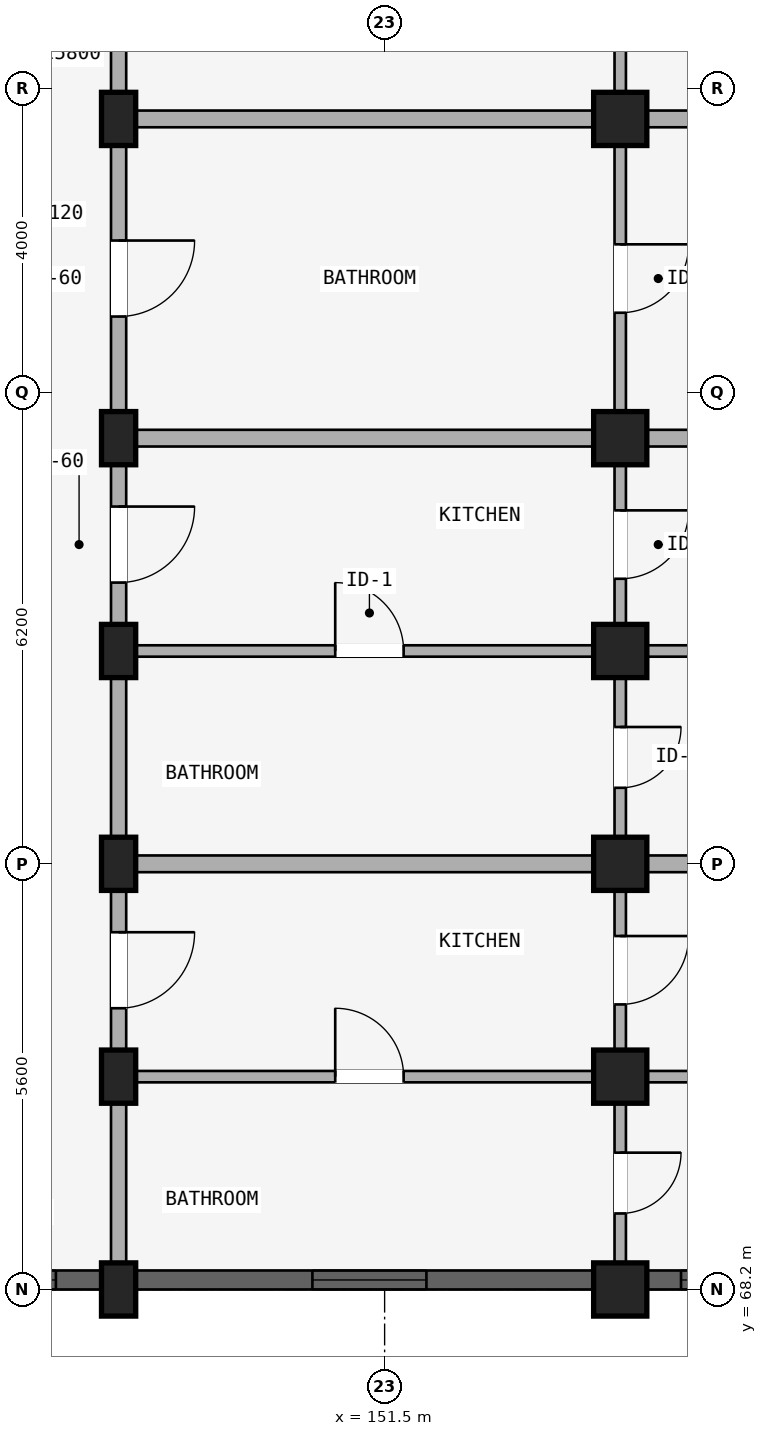
"""IFC4 building model, lengths in metres.
Left out: names, types, materials, properties, quantities, classifications, styles, units other than length and angle.
Written with IfcOpenShell. Run it as: python <this file> out.ifc"""

import sys

from ifc_helpers import new_model, si_unit, direction, frame, frame_2d, origin, origin_2d, place, context, subcontext, project, spatial, rectangle, extrude, element, fill, save


model = new_model("IFC4")
c1 = context("Model", 3, precision=1e-05, world=origin(), true_north=direction((0.0, 1.0)))
c2 = subcontext(c1, "Body", "Model", "MODEL_VIEW")
j1 = project(units=[si_unit("LENGTHUNIT", "METRE"), si_unit("PLANEANGLEUNIT", "RADIAN")], contexts=[c1])
p1 = place(None, origin())
s1 = spatial("IfcSite", under=j1, at=p1, CompositionType="ELEMENT")
p2 = place(p1, origin())
s2 = spatial("IfcBuilding", under=s1, at=p2, CompositionType="ELEMENT")
p3 = place(p2, frame((0.0, 0.0, 24.45)))
s3 = spatial("IfcBuildingStorey", under=s2, at=p3, CompositionType="ELEMENT", Elevation=24.45)
p4 = place(p3, frame((148.0, 83.6, 0.0), z_axis=(0.0, 0.0, 1.0), x_axis=(1.0, 0.0, 0.0)))
e1 = element("IfcColumn", 1, at=p4, inside=s3, PredefinedType="COLUMN", context=c2, shape_type="SweptSolid", body=[
    extrude(rectangle(XDim=0.45, YDim=0.7, at=origin_2d()), origin(), (0.0, 0.0, 1.0), 2.93),
])
p5 = place(p3, frame((154.6, 83.6, 0.0), z_axis=(0.0, 0.0, 1.0), x_axis=(1.0, 0.0, 0.0)))
e2 = element("IfcColumn", 2, at=p5, inside=s3, PredefinedType="COLUMN", context=c2, shape_type="SweptSolid", body=[
    extrude(rectangle(XDim=0.7, YDim=0.7, at=origin_2d()), origin(), (0.0, 0.0, 1.0), 2.93),
])
p6 = place(p3, frame((148.0, 79.4, 0.0), z_axis=(0.0, 0.0, 1.0), x_axis=(1.0, 0.0, 0.0)))
e3 = element("IfcColumn", 3, at=p6, inside=s3, PredefinedType="COLUMN", context=c2, shape_type="SweptSolid", body=[
    extrude(rectangle(XDim=0.45, YDim=0.7, at=origin_2d()), origin(), (0.0, 0.0, 1.0), 2.93),
])
p7 = place(p3, frame((154.6, 79.4, 0.0), z_axis=(0.0, 0.0, 1.0), x_axis=(1.0, 0.0, 0.0)))
e4 = element("IfcColumn", 4, at=p7, inside=s3, PredefinedType="COLUMN", context=c2, shape_type="SweptSolid", body=[
    extrude(rectangle(XDim=0.7, YDim=0.7, at=origin_2d()), origin(), (0.0, 0.0, 1.0), 2.93),
])
p8 = place(p3, frame((148.0, 76.6, 0.0), z_axis=(0.0, 0.0, 1.0), x_axis=(1.0, 0.0, 0.0)))
e5 = element("IfcColumn", 5, at=p8, inside=s3, PredefinedType="COLUMN", context=c2, shape_type="SweptSolid", body=[
    extrude(rectangle(XDim=0.45, YDim=0.7, at=origin_2d()), origin(), (0.0, 0.0, 1.0), 2.93),
])
p9 = place(p3, frame((154.6, 76.6, 0.0), z_axis=(0.0, 0.0, 1.0), x_axis=(1.0, 0.0, 0.0)))
e6 = element("IfcColumn", 6, at=p9, inside=s3, PredefinedType="COLUMN", context=c2, shape_type="SweptSolid", body=[
    extrude(rectangle(XDim=0.7, YDim=0.7, at=origin_2d()), origin(), (0.0, 0.0, 1.0), 2.93),
])
p10 = place(p3, frame((148.0, 73.8, 0.0), z_axis=(0.0, 0.0, 1.0), x_axis=(1.0, 0.0, 0.0)))
e7 = element("IfcColumn", 7, at=p10, inside=s3, PredefinedType="COLUMN", context=c2, shape_type="SweptSolid", body=[
    extrude(rectangle(XDim=0.45, YDim=0.7, at=origin_2d()), origin(), (0.0, 0.0, 1.0), 2.93),
])
p11 = place(p3, frame((154.6, 73.8, 0.0), z_axis=(0.0, 0.0, 1.0), x_axis=(1.0, 0.0, 0.0)))
e8 = element("IfcColumn", 8, at=p11, inside=s3, PredefinedType="COLUMN", context=c2, shape_type="SweptSolid", body=[
    extrude(rectangle(XDim=0.7, YDim=0.7, at=origin_2d()), origin(), (0.0, 0.0, 1.0), 2.93),
])
p12 = place(p3, frame((148.0, 71.0, 0.0), z_axis=(0.0, 0.0, 1.0), x_axis=(1.0, 0.0, 0.0)))
e9 = element("IfcColumn", 9, at=p12, inside=s3, PredefinedType="COLUMN", context=c2, shape_type="SweptSolid", body=[
    extrude(rectangle(XDim=0.45, YDim=0.7, at=origin_2d()), origin(), (0.0, 0.0, 1.0), 2.93),
])
p13 = place(p3, frame((154.6, 71.0, 0.0), z_axis=(0.0, 0.0, 1.0), x_axis=(1.0, 0.0, 0.0)))
e10 = element("IfcColumn", 10, at=p13, inside=s3, PredefinedType="COLUMN", context=c2, shape_type="SweptSolid", body=[
    extrude(rectangle(XDim=0.7, YDim=0.7, at=origin_2d()), origin(), (0.0, 0.0, 1.0), 2.93),
])
p14 = place(p3, frame((148.0, 68.2, 0.0), z_axis=(0.0, 0.0, 1.0), x_axis=(1.0, 0.0, 0.0)))
e11 = element("IfcColumn", 11, at=p14, inside=s3, PredefinedType="COLUMN", context=c2, shape_type="SweptSolid", body=[
    extrude(rectangle(XDim=0.45, YDim=0.7, at=origin_2d()), origin(), (0.0, 0.0, 1.0), 2.97),
])
p15 = place(p3, frame((154.6, 68.2, 0.0), z_axis=(0.0, 0.0, 1.0), x_axis=(1.0, 0.0, 0.0)))
e12 = element("IfcColumn", 12, at=p15, inside=s3, PredefinedType="COLUMN", context=c2, shape_type="SweptSolid", body=[
    extrude(rectangle(XDim=0.7, YDim=0.7, at=origin_2d()), origin(), (0.0, 0.0, 1.0), 2.97),
])
p16 = place(p3, frame((148.0, 87.65, 0.0), z_axis=(0.0, 0.0, 1.0), x_axis=(0.0, -1.0, 0.0)))
e13 = element("IfcWall", 13, at=p16, inside=s3, PredefinedType="STANDARD", context=c2, shape_type="SweptSolid", body=[
    extrude(rectangle(XDim=4.05, YDim=0.2, at=frame_2d((2.025, 0.0))), origin(), (0.0, 0.0, 1.0), 2.372),
])
p17 = place(p16, frame((1.525, 0.0, 0.0)))
e14 = element("IfcOpeningElement", 14, at=p17, cuts=e13, PredefinedType="OPENING", context=c2, shape_type="SweptSolid", body=[
    extrude(rectangle(XDim=1.0, YDim=2.15, at=frame_2d((0.5, 1.075))), frame((0.0, 0.11, 0.0), z_axis=(0.0, -1.0, 0.0), x_axis=(1.0, 0.0, 0.0)), (0.0, 0.0, 1.0), 0.22),
])
p18 = place(p3, frame((154.6, 87.57, 0.0), z_axis=(0.0, 0.0, 1.0), x_axis=(0.0, -1.0, 0.0)))
e15 = element("IfcWall", 15, at=p18, inside=s3, PredefinedType="PARTITIONING", context=c2, shape_type="SweptSolid", body=[
    extrude(rectangle(XDim=3.89, YDim=0.15, at=frame_2d((1.945, 0.0))), origin(), (0.0, 0.0, 1.0), 2.372),
])
p19 = place(p18, frame((1.495, 0.0, 0.0)))
e16 = element("IfcOpeningElement", 16, at=p19, cuts=e15, PredefinedType="OPENING", context=c2, shape_type="SweptSolid", body=[
    extrude(rectangle(XDim=0.9, YDim=2.1, at=frame_2d((0.45, 1.05))), frame((0.0, 0.085, 0.0), z_axis=(0.0, -1.0, 0.0), x_axis=(1.0, 0.0, 0.0)), (0.0, 0.0, 1.0), 0.17),
])
p20 = place(p3, frame((148.0, 83.6, 0.0), z_axis=(0.0, 0.0, 1.0), x_axis=(0.0, -1.0, 0.0)))
e17 = element("IfcWall", 17, at=p20, inside=s3, PredefinedType="STANDARD", context=c2, shape_type="SweptSolid", body=[
    extrude(rectangle(XDim=4.2, YDim=0.2, at=frame_2d((2.1, 0.0))), origin(), (0.0, 0.0, 1.0), 2.372),
])
p21 = place(p20, frame((1.6, 0.0, 0.0)))
e18 = element("IfcOpeningElement", 18, at=p21, cuts=e17, PredefinedType="OPENING", context=c2, shape_type="SweptSolid", body=[
    extrude(rectangle(XDim=1.0, YDim=2.15, at=frame_2d((0.5, 1.075))), frame((0.0, 0.11, 0.0), z_axis=(0.0, -1.0, 0.0), x_axis=(1.0, 0.0, 0.0)), (0.0, 0.0, 1.0), 0.22),
])
p22 = place(p3, frame((154.6, 83.52, 0.0), z_axis=(0.0, 0.0, 1.0), x_axis=(0.0, -1.0, 0.0)))
e19 = element("IfcWall", 19, at=p22, inside=s3, PredefinedType="PARTITIONING", context=c2, shape_type="SweptSolid", body=[
    extrude(rectangle(XDim=4.04, YDim=0.15, at=frame_2d((2.02, 0.0))), origin(), (0.0, 0.0, 1.0), 2.372),
])
p23 = place(p22, frame((1.57, 0.0, 0.0)))
e20 = element("IfcOpeningElement", 20, at=p23, cuts=e19, PredefinedType="OPENING", context=c2, shape_type="SweptSolid", body=[
    extrude(rectangle(XDim=0.9, YDim=2.1, at=frame_2d((0.45, 1.05))), frame((0.0, 0.085, 0.0), z_axis=(0.0, -1.0, 0.0), x_axis=(1.0, 0.0, 0.0)), (0.0, 0.0, 1.0), 0.17),
])
p24 = place(p3, frame((148.05, 83.6, 0.0), z_axis=(0.0, 0.0, 1.0), x_axis=(1.0, 0.0, 0.0)))
e21 = element("IfcWall", 21, at=p24, inside=s3, PredefinedType="STANDARD", context=c2, shape_type="SweptSolid", body=[
    extrude(rectangle(XDim=17.53, YDim=0.22, at=frame_2d((8.765, 0.0))), origin(), (0.0, 0.0, 1.0), 2.372),
])
p25 = place(p3, frame((148.0, 79.4, 0.0), z_axis=(0.0, 0.0, 1.0), x_axis=(0.0, -1.0, 0.0)))
e22 = element("IfcWall", 22, at=p25, inside=s3, PredefinedType="STANDARD", context=c2, shape_type="SweptSolid", body=[
    extrude(rectangle(XDim=2.8, YDim=0.2, at=frame_2d((1.4, 0.0))), origin(), (0.0, 0.0, 1.0), 2.372),
])
p26 = place(p25, frame((0.9, 0.0, 0.0)))
e23 = element("IfcOpeningElement", 23, at=p26, cuts=e22, PredefinedType="OPENING", context=c2, shape_type="SweptSolid", body=[
    extrude(rectangle(XDim=1.0, YDim=2.15, at=frame_2d((0.5, 1.075))), frame((0.0, 0.11, 0.0), z_axis=(0.0, -1.0, 0.0), x_axis=(1.0, 0.0, 0.0)), (0.0, 0.0, 1.0), 0.22),
])
p27 = place(p3, frame((154.6, 79.32, 0.0), z_axis=(0.0, 0.0, 1.0), x_axis=(0.0, -1.0, 0.0)))
e24 = element("IfcWall", 24, at=p27, inside=s3, PredefinedType="PLUMBINGWALL", context=c2, shape_type="SweptSolid", body=[
    extrude(rectangle(XDim=2.64, YDim=0.15, at=frame_2d((1.32, 0.0))), origin(), (0.0, 0.0, 1.0), 2.372),
])
p28 = place(p27, frame((0.87, 0.0, 0.0)))
e25 = element("IfcOpeningElement", 25, at=p28, cuts=e24, PredefinedType="OPENING", context=c2, shape_type="SweptSolid", body=[
    extrude(rectangle(XDim=0.9, YDim=2.1, at=frame_2d((0.45, 1.05))), frame((0.0, 0.085, 0.0), z_axis=(0.0, -1.0, 0.0), x_axis=(1.0, 0.0, 0.0)), (0.0, 0.0, 1.0), 0.17),
])
p29 = place(p3, frame((148.1, 79.4, 0.0), z_axis=(0.0, 0.0, 1.0), x_axis=(1.0, 0.0, 0.0)))
e26 = element("IfcWall", 26, at=p29, inside=s3, PredefinedType="STANDARD", context=c2, shape_type="SweptSolid", body=[
    extrude(rectangle(XDim=17.42, YDim=0.22, at=frame_2d((8.71, 0.0))), origin(), (0.0, 0.0, 1.0), 2.372),
])
p30 = place(p3, frame((148.0, 76.6, 0.0), z_axis=(0.0, 0.0, 1.0), x_axis=(0.0, -1.0, 0.0)))
e27 = element("IfcWall", 27, at=p30, inside=s3, PredefinedType="STANDARD", context=c2, shape_type="SweptSolid", body=[
    extrude(rectangle(XDim=2.8, YDim=0.2, at=frame_2d((1.4, 0.0))), origin(), (0.0, 0.0, 1.0), 2.372),
])
p31 = place(p3, frame((154.6, 76.52, 0.0), z_axis=(0.0, 0.0, 1.0), x_axis=(0.0, -1.0, 0.0)))
e28 = element("IfcWall", 28, at=p31, inside=s3, PredefinedType="PLUMBINGWALL", context=c2, shape_type="SweptSolid", body=[
    extrude(rectangle(XDim=2.64, YDim=0.15, at=frame_2d((1.32, 0.0))), origin(), (0.0, 0.0, 1.0), 2.372),
])
p32 = place(p31, frame((0.92, 0.0, 0.0)))
e29 = element("IfcOpeningElement", 29, at=p32, cuts=e28, PredefinedType="OPENING", context=c2, shape_type="SweptSolid", body=[
    extrude(rectangle(XDim=0.8, YDim=2.1, at=frame_2d((0.4, 1.05))), frame((0.0, 0.085, 0.0), z_axis=(0.0, -1.0, 0.0), x_axis=(1.0, 0.0, 0.0)), (0.0, 0.0, 1.0), 0.17),
])
p33 = place(p3, frame((148.1, 76.6, 0.0), z_axis=(0.0, 0.0, 1.0), x_axis=(1.0, 0.0, 0.0)))
e30 = element("IfcWall", 30, at=p33, inside=s3, PredefinedType="PARTITIONING", context=c2, shape_type="SweptSolid", body=[
    extrude(rectangle(XDim=17.42, YDim=0.15, at=frame_2d((8.71, 0.0))), origin(), (0.0, 0.0, 1.0), 2.372),
])
p34 = place(p33, frame((2.75, 0.0, 0.0)))
e31 = element("IfcOpeningElement", 31, at=p34, cuts=e30, PredefinedType="OPENING", context=c2, shape_type="SweptSolid", body=[
    extrude(rectangle(XDim=0.9, YDim=2.1, at=frame_2d((0.45, 1.05))), frame((0.0, 0.085, 0.0), z_axis=(0.0, -1.0, 0.0), x_axis=(1.0, 0.0, 0.0)), (0.0, 0.0, 1.0), 0.17),
])
p35 = place(p3, frame((148.0, 73.8, 0.0), z_axis=(0.0, 0.0, 1.0), x_axis=(0.0, -1.0, 0.0)))
e32 = element("IfcWall", 32, at=p35, inside=s3, PredefinedType="STANDARD", context=c2, shape_type="SweptSolid", body=[
    extrude(rectangle(XDim=2.8, YDim=0.2, at=frame_2d((1.4, 0.0))), origin(), (0.0, 0.0, 1.0), 2.372),
])
p36 = place(p35, frame((0.9, 0.0, 0.0)))
e33 = element("IfcOpeningElement", 33, at=p36, cuts=e32, PredefinedType="OPENING", context=c2, shape_type="SweptSolid", body=[
    extrude(rectangle(XDim=1.0, YDim=2.15, at=frame_2d((0.5, 1.075))), frame((0.0, 0.11, 0.0), z_axis=(0.0, -1.0, 0.0), x_axis=(1.0, 0.0, 0.0)), (0.0, 0.0, 1.0), 0.22),
])
p37 = place(p3, frame((154.6, 73.72, 0.0), z_axis=(0.0, 0.0, 1.0), x_axis=(0.0, -1.0, 0.0)))
e34 = element("IfcWall", 34, at=p37, inside=s3, PredefinedType="PLUMBINGWALL", context=c2, shape_type="SweptSolid", body=[
    extrude(rectangle(XDim=2.64, YDim=0.15, at=frame_2d((1.32, 0.0))), origin(), (0.0, 0.0, 1.0), 2.372),
])
p38 = place(p37, frame((0.87, 0.0, 0.0)))
e35 = element("IfcOpeningElement", 35, at=p38, cuts=e34, PredefinedType="OPENING", context=c2, shape_type="SweptSolid", body=[
    extrude(rectangle(XDim=0.9, YDim=2.1, at=frame_2d((0.45, 1.05))), frame((0.0, 0.085, 0.0), z_axis=(0.0, -1.0, 0.0), x_axis=(1.0, 0.0, 0.0)), (0.0, 0.0, 1.0), 0.17),
])
p39 = place(p3, frame((148.1, 73.8, 0.0), z_axis=(0.0, 0.0, 1.0), x_axis=(1.0, 0.0, 0.0)))
e36 = element("IfcWall", 36, at=p39, inside=s3, PredefinedType="STANDARD", context=c2, shape_type="SweptSolid", body=[
    extrude(rectangle(XDim=17.42, YDim=0.22, at=frame_2d((8.71, 0.0))), origin(), (0.0, 0.0, 1.0), 2.372),
])
p40 = place(p3, frame((148.0, 71.0, 0.0), z_axis=(0.0, 0.0, 1.0), x_axis=(0.0, -1.0, 0.0)))
e37 = element("IfcWall", 37, at=p40, inside=s3, PredefinedType="STANDARD", context=c2, shape_type="SweptSolid", body=[
    extrude(rectangle(XDim=2.8, YDim=0.2, at=frame_2d((1.4, 0.0))), origin(), (0.0, 0.0, 1.0), 2.372),
])
p41 = place(p3, frame((154.6, 70.92, 0.0), z_axis=(0.0, 0.0, 1.0), x_axis=(0.0, -1.0, 0.0)))
e38 = element("IfcWall", 38, at=p41, inside=s3, PredefinedType="PLUMBINGWALL", context=c2, shape_type="SweptSolid", body=[
    extrude(rectangle(XDim=2.64, YDim=0.15, at=frame_2d((1.32, 0.0))), origin(), (0.0, 0.0, 1.0), 2.372),
])
p42 = place(p41, frame((0.92, 0.0, 0.0)))
e39 = element("IfcOpeningElement", 39, at=p42, cuts=e38, PredefinedType="OPENING", context=c2, shape_type="SweptSolid", body=[
    extrude(rectangle(XDim=0.8, YDim=2.1, at=frame_2d((0.4, 1.05))), frame((0.0, 0.085, 0.0), z_axis=(0.0, -1.0, 0.0), x_axis=(1.0, 0.0, 0.0)), (0.0, 0.0, 1.0), 0.17),
])
p43 = place(p3, frame((148.1, 71.0, 0.0), z_axis=(0.0, 0.0, 1.0), x_axis=(1.0, 0.0, 0.0)))
e40 = element("IfcWall", 40, at=p43, inside=s3, PredefinedType="PARTITIONING", context=c2, shape_type="SweptSolid", body=[
    extrude(rectangle(XDim=17.42, YDim=0.15, at=frame_2d((8.71, 0.0))), origin(), (0.0, 0.0, 1.0), 2.372),
])
p44 = place(p43, frame((2.75, 0.0, 0.0)))
e41 = element("IfcOpeningElement", 41, at=p44, cuts=e40, PredefinedType="OPENING", context=c2, shape_type="SweptSolid", body=[
    extrude(rectangle(XDim=0.9, YDim=2.1, at=frame_2d((0.45, 1.05))), frame((0.0, 0.085, 0.0), z_axis=(0.0, -1.0, 0.0), x_axis=(1.0, 0.0, 0.0)), (0.0, 0.0, 1.0), 0.17),
])
p45 = place(p3, frame((145.829, 68.325, 0.0), z_axis=(0.0, 0.0, 1.0), x_axis=(1.0, 0.0, 0.0)))
e42 = element("IfcWall", 42, at=p45, inside=s3, PredefinedType="STANDARD", context=c2, shape_type="SweptSolid", body=[
    extrude(rectangle(XDim=1.943, YDim=0.25, at=frame_2d((0.971, 0.0))), origin(), (0.0, 0.0, 1.0), 2.372),
])
p46 = place(p45, frame((0.596, 0.0, 0.88)))
e43 = element("IfcOpeningElement", 43, at=p46, cuts=e42, PredefinedType="OPENING", context=c2, shape_type="SweptSolid", body=[
    extrude(rectangle(XDim=0.75, YDim=1.05, at=frame_2d((0.375, 0.525))), frame((0.0, 0.135, 0.0), z_axis=(0.0, -1.0, 0.0), x_axis=(1.0, 0.0, 0.0)), (0.0, 0.0, 1.0), 0.27),
])
p47 = place(p3, frame((148.229, 68.325, 0.0), z_axis=(0.0, 0.0, 1.0), x_axis=(1.0, 0.0, 0.0)))
e44 = element("IfcWall", 44, at=p47, inside=s3, PredefinedType="STANDARD", context=c2, shape_type="SweptSolid", body=[
    extrude(rectangle(XDim=6.018, YDim=0.25, at=frame_2d((3.009, 0.0))), origin(), (0.0, 0.0, 1.0), 2.372),
])
p48 = place(p47, frame((2.322, 0.0, 0.522)))
e45 = element("IfcOpeningElement", 45, at=p48, cuts=e44, PredefinedType="OPENING", context=c2, shape_type="SweptSolid", body=[
    extrude(rectangle(XDim=1.5, YDim=1.65, at=frame_2d((0.75, 0.825))), frame((0.0, 0.135, 0.0), z_axis=(0.0, -1.0, 0.0), x_axis=(1.0, 0.0, 0.0)), (0.0, 0.0, 1.0), 0.27),
])
p49 = place(p3, frame((154.954, 68.325, 0.0), z_axis=(0.0, 0.0, 1.0), x_axis=(1.0, 0.0, 0.0)))
e46 = element("IfcWall", 46, at=p49, inside=s3, PredefinedType="STANDARD", context=c2, shape_type="SweptSolid", body=[
    extrude(rectangle(XDim=2.093, YDim=0.25, at=frame_2d((1.046, 0.0))), origin(), (0.0, 0.0, 1.0), 2.372),
])
p50 = place(p49, frame((0.447, 0.0, 0.672)))
e47 = element("IfcOpeningElement", 47, at=p50, cuts=e46, PredefinedType="OPENING", context=c2, shape_type="SweptSolid", body=[
    extrude(rectangle(XDim=1.2, YDim=1.5, at=frame_2d((0.6, 0.75))), frame((0.0, 0.135, 0.0), z_axis=(0.0, -1.0, 0.0), x_axis=(1.0, 0.0, 0.0)), (0.0, 0.0, 1.0), 0.27),
])
p51 = place(p46, origin())
e48 = element("IfcWindow", 48, at=p51, inside=s3, PartitioningType="SINGLE_PANEL", PredefinedType="WINDOW", context=c2, shape_type="SweptSolid", body=[
    extrude(rectangle(XDim=0.75, YDim=1.05, at=frame_2d((0.375, 0.525))), frame((0.0, 0.03, 0.0), z_axis=(0.0, -1.0, 0.0), x_axis=(1.0, 0.0, 0.0)), (0.0, 0.0, 1.0), 0.06),
])
fill(e43, e48)
p52 = place(p48, origin())
e49 = element("IfcWindow", 49, at=p52, inside=s3, PartitioningType="DOUBLE_PANEL_VERTICAL", PredefinedType="WINDOW", context=c2, shape_type="SweptSolid", body=[
    extrude(rectangle(XDim=1.5, YDim=1.65, at=frame_2d((0.75, 0.825))), frame((0.0, 0.03, 0.0), z_axis=(0.0, -1.0, 0.0), x_axis=(1.0, 0.0, 0.0)), (0.0, 0.0, 1.0), 0.06),
])
fill(e45, e49)
p53 = place(p50, origin())
e50 = element("IfcWindow", 50, at=p53, inside=s3, PartitioningType="SINGLE_PANEL", PredefinedType="WINDOW", context=c2, shape_type="SweptSolid", body=[
    extrude(rectangle(XDim=1.2, YDim=1.5, at=frame_2d((0.6, 0.75))), frame((0.0, 0.03, 0.0), z_axis=(0.0, -1.0, 0.0), x_axis=(1.0, 0.0, 0.0)), (0.0, 0.0, 1.0), 0.06),
])
fill(e47, e50)
p54 = place(p21, origin())
e51 = element("IfcDoor", 51, at=p54, inside=s3, OperationType="SINGLE_SWING_LEFT", PredefinedType="DOOR", context=c2, shape_type="SweptSolid", body=[
    extrude(rectangle(XDim=1.0, YDim=2.15, at=frame_2d((0.5, 1.075))), frame((0.0, 0.025, 0.0), z_axis=(0.0, -1.0, 0.0), x_axis=(1.0, 0.0, 0.0)), (0.0, 0.0, 1.0), 0.05),
])
fill(e18, e51)
p55 = place(p23, frame((0.9, 0.0, 0.0), z_axis=(0.0, 0.0, 1.0), x_axis=(-1.0, 0.0, 0.0)))
e52 = element("IfcDoor", 52, at=p55, inside=s3, OperationType="SINGLE_SWING_RIGHT", PredefinedType="DOOR", context=c2, shape_type="SweptSolid", body=[
    extrude(rectangle(XDim=0.9, YDim=2.1, at=frame_2d((0.45, 1.05))), frame((0.0, 0.025, 0.0), z_axis=(0.0, -1.0, 0.0), x_axis=(1.0, 0.0, 0.0)), (0.0, 0.0, 1.0), 0.05),
])
fill(e20, e52)
p56 = place(p28, frame((0.9, 0.0, 0.0), z_axis=(0.0, 0.0, 1.0), x_axis=(-1.0, 0.0, 0.0)))
e53 = element("IfcDoor", 53, at=p56, inside=s3, OperationType="SINGLE_SWING_RIGHT", PredefinedType="DOOR", context=c2, shape_type="SweptSolid", body=[
    extrude(rectangle(XDim=0.9, YDim=2.1, at=frame_2d((0.45, 1.05))), frame((0.0, 0.025, 0.0), z_axis=(0.0, -1.0, 0.0), x_axis=(1.0, 0.0, 0.0)), (0.0, 0.0, 1.0), 0.05),
])
fill(e25, e53)
p57 = place(p26, origin())
e54 = element("IfcDoor", 54, at=p57, inside=s3, OperationType="SINGLE_SWING_LEFT", PredefinedType="DOOR", context=c2, shape_type="SweptSolid", body=[
    extrude(rectangle(XDim=1.0, YDim=2.15, at=frame_2d((0.5, 1.075))), frame((0.0, 0.025, 0.0), z_axis=(0.0, -1.0, 0.0), x_axis=(1.0, 0.0, 0.0)), (0.0, 0.0, 1.0), 0.05),
])
fill(e23, e54)
p58 = place(p32, frame((0.8, 0.0, 0.0), z_axis=(0.0, 0.0, 1.0), x_axis=(-1.0, 0.0, 0.0)))
e55 = element("IfcDoor", 55, at=p58, inside=s3, OperationType="SINGLE_SWING_RIGHT", PredefinedType="DOOR", context=c2, shape_type="SweptSolid", body=[
    extrude(rectangle(XDim=0.8, YDim=2.1, at=frame_2d((0.4, 1.05))), frame((0.0, 0.025, 0.0), z_axis=(0.0, -1.0, 0.0), x_axis=(1.0, 0.0, 0.0)), (0.0, 0.0, 1.0), 0.05),
])
fill(e29, e55)
p59 = place(p34, frame((0.9, 0.0, 0.0), z_axis=(0.0, 0.0, 1.0), x_axis=(-1.0, 0.0, 0.0)))
e56 = element("IfcDoor", 56, at=p59, inside=s3, OperationType="SINGLE_SWING_RIGHT", PredefinedType="DOOR", context=c2, shape_type="SweptSolid", body=[
    extrude(rectangle(XDim=0.9, YDim=2.1, at=frame_2d((0.45, 1.05))), frame((0.0, 0.025, 0.0), z_axis=(0.0, -1.0, 0.0), x_axis=(1.0, 0.0, 0.0)), (0.0, 0.0, 1.0), 0.05),
])
fill(e31, e56)
p60 = place(p38, frame((0.9, 0.0, 0.0), z_axis=(0.0, 0.0, 1.0), x_axis=(-1.0, 0.0, 0.0)))
e57 = element("IfcDoor", 57, at=p60, inside=s3, OperationType="SINGLE_SWING_RIGHT", PredefinedType="DOOR", context=c2, shape_type="SweptSolid", body=[
    extrude(rectangle(XDim=0.9, YDim=2.1, at=frame_2d((0.45, 1.05))), frame((0.0, 0.025, 0.0), z_axis=(0.0, -1.0, 0.0), x_axis=(1.0, 0.0, 0.0)), (0.0, 0.0, 1.0), 0.05),
])
fill(e35, e57)
p61 = place(p36, origin())
e58 = element("IfcDoor", 58, at=p61, inside=s3, OperationType="SINGLE_SWING_LEFT", PredefinedType="DOOR", context=c2, shape_type="SweptSolid", body=[
    extrude(rectangle(XDim=1.0, YDim=2.15, at=frame_2d((0.5, 1.075))), frame((0.0, 0.025, 0.0), z_axis=(0.0, -1.0, 0.0), x_axis=(1.0, 0.0, 0.0)), (0.0, 0.0, 1.0), 0.05),
])
fill(e33, e58)
p62 = place(p42, frame((0.8, 0.0, 0.0), z_axis=(0.0, 0.0, 1.0), x_axis=(-1.0, 0.0, 0.0)))
e59 = element("IfcDoor", 59, at=p62, inside=s3, OperationType="SINGLE_SWING_RIGHT", PredefinedType="DOOR", context=c2, shape_type="SweptSolid", body=[
    extrude(rectangle(XDim=0.8, YDim=2.1, at=frame_2d((0.4, 1.05))), frame((0.0, 0.025, 0.0), z_axis=(0.0, -1.0, 0.0), x_axis=(1.0, 0.0, 0.0)), (0.0, 0.0, 1.0), 0.05),
])
fill(e39, e59)
p63 = place(p44, frame((0.9, 0.0, 0.0), z_axis=(0.0, 0.0, 1.0), x_axis=(-1.0, 0.0, 0.0)))
e60 = element("IfcDoor", 60, at=p63, inside=s3, OperationType="SINGLE_SWING_RIGHT", PredefinedType="DOOR", context=c2, shape_type="SweptSolid", body=[
    extrude(rectangle(XDim=0.9, YDim=2.1, at=frame_2d((0.45, 1.05))), frame((0.0, 0.025, 0.0), z_axis=(0.0, -1.0, 0.0), x_axis=(1.0, 0.0, 0.0)), (0.0, 0.0, 1.0), 0.05),
])
fill(e41, e60)
save(model, sys.argv[1])
